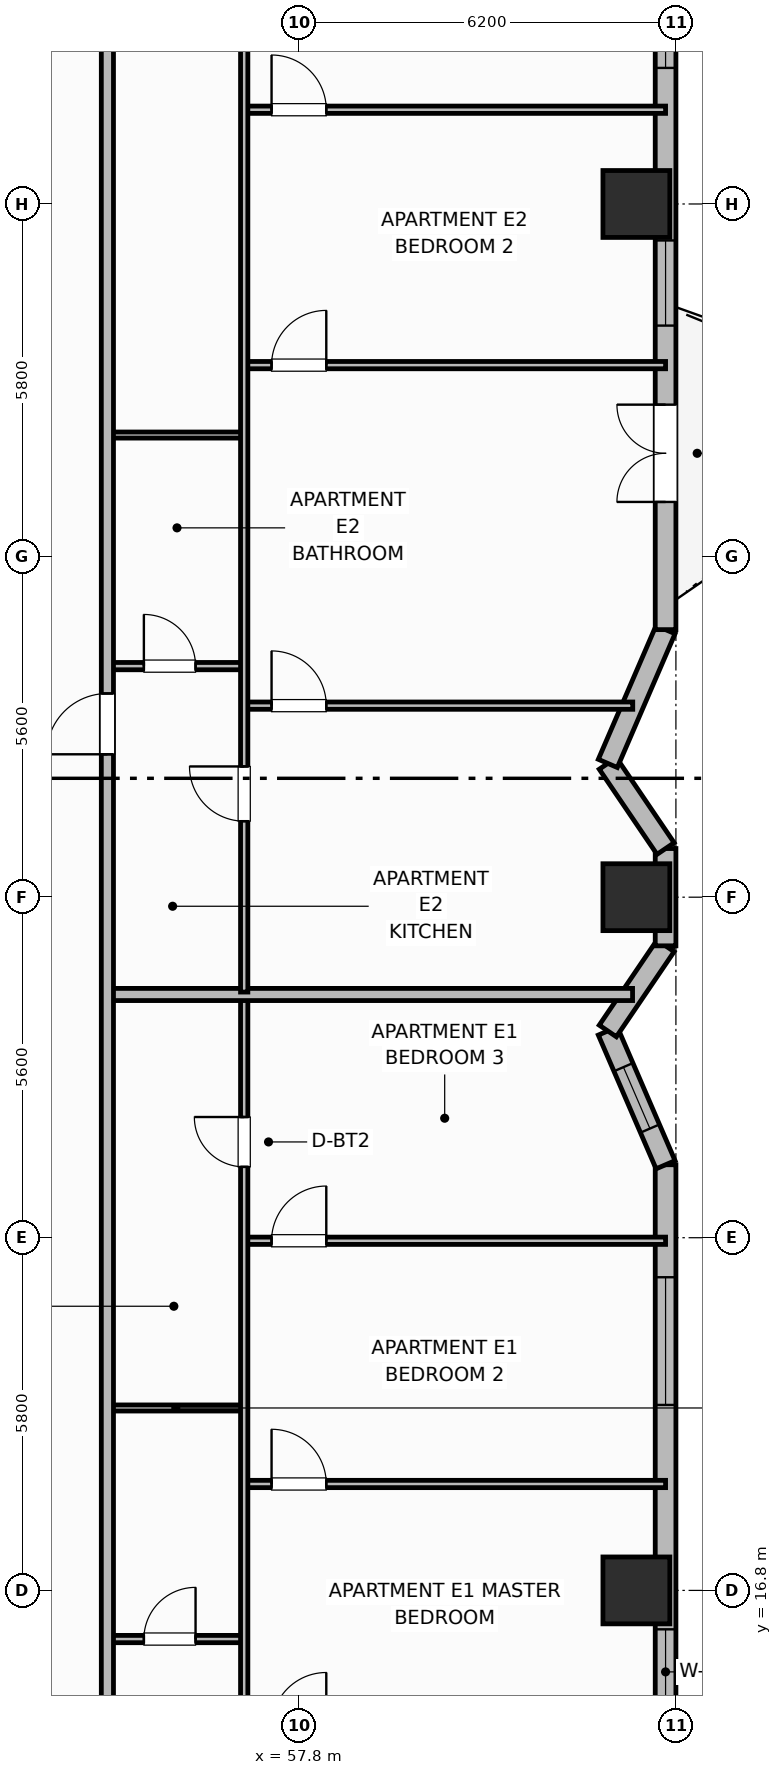
"""IFC4 building model, lengths in metres.
Left out: names, types, materials, properties, quantities, classifications, styles, units other than length and angle.
Written with IfcOpenShell. Run it as: python <this file> out.ifc"""

import sys

from ifc_helpers import new_model, si_unit, direction, frame, frame_2d, origin, origin_2d, place, context, subcontext, project, spatial, rectangle, extrude, element, fill, save


model = new_model("IFC4")
c1 = context("Model", 3, precision=1e-05, world=origin(), true_north=direction((0.0, 1.0)))
c2 = subcontext(c1, "Body", "Model", "MODEL_VIEW")
j1 = project(units=[si_unit("LENGTHUNIT", "METRE"), si_unit("PLANEANGLEUNIT", "RADIAN")], contexts=[c1])
p1 = place(None, origin())
s1 = spatial("IfcSite", under=j1, at=p1, CompositionType="ELEMENT")
p2 = place(p1, origin())
s2 = spatial("IfcBuilding", under=s1, at=p2, CompositionType="ELEMENT")
p3 = place(p2, frame((0.0, 0.0, 95.7)))
s3 = spatial("IfcBuildingStorey", under=s2, at=p3, CompositionType="ELEMENT", Elevation=95.7)
for number, where, z_axis, x_axis in (
    (1, (63.35, 16.8, 0.0), (0.0, 0.0, 1.0), (1.0, 0.0, 0.0)),
    (2, (63.35, 28.2, 0.0), (0.0, 0.0, 1.0), (1.0, 0.0, 0.0)),
    (3, (63.35, 39.6, 0.0), (0.0, 0.0, 1.0), (1.0, 0.0, 0.0)),
):
    element("IfcColumn", number, at=place(p3, frame(where, z_axis=z_axis, x_axis=x_axis)), inside=s3, PredefinedType="COLUMN", context=c2, shape_type="SweptSolid", body=[
        extrude(rectangle(XDim=1.1, YDim=1.1, at=origin_2d()), origin(), (0.0, 0.0, 1.0), 3.7),
    ])
p4 = place(p3, frame((63.83, 9.0, 0.0), z_axis=(0.0, 0.0, 1.0), x_axis=(0.0, 1.0, 0.0)))
e4 = element("IfcWall", 4, at=p4, inside=s3, PredefinedType="SOLIDWALL", context=c2, shape_type="SweptSolid", body=[
    extrude(rectangle(XDim=14.8, YDim=0.34, at=frame_2d((7.4, 0.0))), origin(), (0.0, 0.0, 1.0), 2.7),
])
p5 = place(p4, frame((2.9, 0.0, 0.68)))
e5 = element("IfcOpeningElement", 5, at=p5, cuts=e4, PredefinedType="OPENING", context=c2, shape_type="SweptSolid", body=[
    extrude(rectangle(XDim=2.1, YDim=1.9, at=frame_2d((1.05, 0.95))), frame((0.0, 0.18, 0.0), z_axis=(0.0, -1.0, 0.0), x_axis=(1.0, 0.0, 0.0)), (0.0, 0.0, 1.0), 0.36),
])
p6 = place(p4, frame((5.76, 0.0, 0.69)))
e6 = element("IfcOpeningElement", 6, at=p6, cuts=e4, PredefinedType="OPENING", context=c2, shape_type="SweptSolid", body=[
    extrude(rectangle(XDim=1.4, YDim=1.85, at=frame_2d((0.7, 0.925))), frame((0.0, 0.18, 0.0), z_axis=(0.0, -1.0, 0.0), x_axis=(1.0, 0.0, 0.0)), (0.0, 0.0, 1.0), 0.36),
])
p7 = place(p4, frame((10.85, 0.0, 0.68)))
e7 = element("IfcOpeningElement", 7, at=p7, cuts=e4, PredefinedType="OPENING", context=c2, shape_type="SweptSolid", body=[
    extrude(rectangle(XDim=2.1, YDim=1.9, at=frame_2d((1.05, 0.95))), frame((0.0, 0.18, 0.0), z_axis=(0.0, -1.0, 0.0), x_axis=(1.0, 0.0, 0.0)), (0.0, 0.0, 1.0), 0.36),
])
p8 = place(p3, frame((63.83, 23.8, 0.0), z_axis=(0.0, 0.0, 1.0), x_axis=(-0.396512124623, 0.918029484835, 0.0)))
e8 = element("IfcWall", 8, at=p8, inside=s3, PredefinedType="SOLIDWALL", context=c2, shape_type="SweptSolid", body=[
    extrude(rectangle(XDim=2.396, YDim=0.34, at=frame_2d((1.198, 0.0))), origin(), (0.0, 0.0, 1.0), 2.7),
])
p9 = place(p8, frame((0.648, 0.0, 0.89)))
e9 = element("IfcOpeningElement", 9, at=p9, cuts=e8, PredefinedType="OPENING", context=c2, shape_type="SweptSolid", body=[
    extrude(rectangle(XDim=1.1, YDim=1.65, at=frame_2d((0.55, 0.825))), frame((0.0, 0.18, 0.0), z_axis=(0.0, -1.0, 0.0), x_axis=(1.0, 0.0, 0.0)), (0.0, 0.0, 1.0), 0.36),
])
p10 = place(p3, frame((62.88, 26.0, 0.0), z_axis=(0.0, 0.0, 1.0), x_axis=(0.561607274182, 0.827403933751, 0.0)))
e10 = element("IfcWall", 10, at=p10, inside=s3, PredefinedType="SOLIDWALL", context=c2, shape_type="SweptSolid", body=[
    extrude(rectangle(XDim=1.692, YDim=0.34, at=frame_2d((0.846, 0.0))), origin(), (0.0, 0.0, 1.0), 2.7),
])
p11 = place(p3, frame((63.83, 27.4, 0.0), z_axis=(0.0, 0.0, 1.0), x_axis=(0.0, 1.0, 0.0)))
e11 = element("IfcWall", 11, at=p11, inside=s3, PredefinedType="SOLIDWALL", context=c2, shape_type="SweptSolid", body=[
    extrude(rectangle(XDim=1.6, YDim=0.34, at=frame_2d((0.8, 0.0))), origin(), (0.0, 0.0, 1.0), 2.7),
])
p12 = place(p3, frame((63.83, 29.0, 0.0), z_axis=(0.0, 0.0, 1.0), x_axis=(-0.561607274182, 0.827403933751, 0.0)))
e12 = element("IfcWall", 12, at=p12, inside=s3, PredefinedType="SOLIDWALL", context=c2, shape_type="SweptSolid", body=[
    extrude(rectangle(XDim=1.692, YDim=0.34, at=frame_2d((0.846, 0.0))), origin(), (0.0, 0.0, 1.0), 2.7),
])
p13 = place(p3, frame((62.88, 30.4, 0.0), z_axis=(0.0, 0.0, 1.0), x_axis=(0.396475042899, 0.918045500157, 0.0)))
e13 = element("IfcWall", 13, at=p13, inside=s3, PredefinedType="SOLIDWALL", context=c2, shape_type="SweptSolid", body=[
    extrude(rectangle(XDim=2.397, YDim=0.34, at=frame_2d((1.198, 0.0))), origin(), (0.0, 0.0, 1.0), 2.7),
])
p14 = place(p3, frame((63.83, 32.6, 0.0), z_axis=(0.0, 0.0, 1.0), x_axis=(0.0, 1.0, 0.0)))
e14 = element("IfcWall", 14, at=p14, inside=s3, PredefinedType="SOLIDWALL", context=c2, shape_type="SweptSolid", body=[
    extrude(rectangle(XDim=14.8, YDim=0.34, at=frame_2d((7.4, 0.0))), origin(), (0.0, 0.0, 1.0), 2.7),
])
p15 = place(p14, frame((2.1, 0.0, 0.0)))
e15 = element("IfcOpeningElement", 15, at=p15, cuts=e14, PredefinedType="OPENING", context=c2, shape_type="SweptSolid", body=[
    extrude(rectangle(XDim=1.6, YDim=2.1, at=frame_2d((0.8, 1.05))), frame((0.0, 0.18, 0.0), z_axis=(0.0, -1.0, 0.0), x_axis=(1.0, 0.0, 0.0)), (0.0, 0.0, 1.0), 0.36),
])
p16 = place(p14, frame((5.0, 0.0, 0.69)))
e16 = element("IfcOpeningElement", 16, at=p16, cuts=e14, PredefinedType="OPENING", context=c2, shape_type="SweptSolid", body=[
    extrude(rectangle(XDim=1.4, YDim=1.85, at=frame_2d((0.7, 0.925))), frame((0.0, 0.18, 0.0), z_axis=(0.0, -1.0, 0.0), x_axis=(1.0, 0.0, 0.0)), (0.0, 0.0, 1.0), 0.36),
])
p17 = place(p14, frame((9.238, 0.0, 0.73)))
e17 = element("IfcOpeningElement", 17, at=p17, cuts=e14, PredefinedType="OPENING", context=c2, shape_type="SweptSolid", body=[
    extrude(rectangle(XDim=1.8, YDim=1.85, at=frame_2d((0.9, 0.925))), frame((0.0, 0.18, 0.0), z_axis=(0.0, -1.0, 0.0), x_axis=(1.0, 0.0, 0.0)), (0.0, 0.0, 1.0), 0.36),
])
p18 = place(p3, frame((54.65, 16.0, 0.0), z_axis=(0.0, 0.0, 1.0), x_axis=(1.0, 0.0, 0.0)))
e18 = element("IfcWall", 18, at=p18, inside=s3, PredefinedType="PARTITIONING", context=c2, shape_type="SweptSolid", body=[
    extrude(rectangle(XDim=2.25, YDim=0.12, at=frame_2d((1.125, 0.0))), origin(), (0.0, 0.0, 1.0), 2.53),
])
p19 = place(p18, frame((0.6, 0.0, 0.0)))
e19 = element("IfcOpeningElement", 19, at=p19, cuts=e18, PredefinedType="OPENING", context=c2, shape_type="SweptSolid", body=[
    extrude(rectangle(XDim=0.85, YDim=2.1, at=frame_2d((0.425, 1.05))), frame((0.0, 0.07, 0.0), z_axis=(0.0, -1.0, 0.0), x_axis=(1.0, 0.0, 0.0)), (0.0, 0.0, 1.0), 0.14),
])
p20 = place(p3, frame((54.65, 19.8, 0.0), z_axis=(0.0, 0.0, 1.0), x_axis=(1.0, 0.0, 0.0)))
e20 = element("IfcWall", 20, at=p20, inside=s3, PredefinedType="PARTITIONING", context=c2, shape_type="SweptSolid", body=[
    extrude(rectangle(XDim=2.25, YDim=0.1, at=frame_2d((1.125, 0.0))), origin(), (0.0, 0.0, 1.0), 2.53),
])
p21 = place(p3, frame((56.9, 18.55, 0.0), z_axis=(0.0, 0.0, 1.0), x_axis=(1.0, 0.0, 0.0)))
e21 = element("IfcWall", 21, at=p21, inside=s3, PredefinedType="PARTITIONING", context=c2, shape_type="SweptSolid", body=[
    extrude(rectangle(XDim=6.93, YDim=0.12, at=frame_2d((3.465, 0.0))), origin(), (0.0, 0.0, 1.0), 2.53),
])
p22 = place(p21, frame((0.45, 0.0, 0.0)))
e22 = element("IfcOpeningElement", 22, at=p22, cuts=e21, PredefinedType="OPENING", context=c2, shape_type="SweptSolid", body=[
    extrude(rectangle(XDim=0.9, YDim=2.1, at=frame_2d((0.45, 1.05))), frame((0.0, 0.07, 0.0), z_axis=(0.0, -1.0, 0.0), x_axis=(1.0, 0.0, 0.0)), (0.0, 0.0, 1.0), 0.14),
])
p23 = place(p3, frame((56.9, 22.55, 0.0), z_axis=(0.0, 0.0, 1.0), x_axis=(1.0, 0.0, 0.0)))
e23 = element("IfcWall", 23, at=p23, inside=s3, PredefinedType="PARTITIONING", context=c2, shape_type="SweptSolid", body=[
    extrude(rectangle(XDim=6.93, YDim=0.12, at=frame_2d((3.465, 0.0))), origin(), (0.0, 0.0, 1.0), 2.53),
])
p24 = place(p23, frame((0.45, 0.0, 0.0)))
e24 = element("IfcOpeningElement", 24, at=p24, cuts=e23, PredefinedType="OPENING", context=c2, shape_type="SweptSolid", body=[
    extrude(rectangle(XDim=0.9, YDim=2.1, at=frame_2d((0.45, 1.05))), frame((0.0, 0.07, 0.0), z_axis=(0.0, -1.0, 0.0), x_axis=(1.0, 0.0, 0.0)), (0.0, 0.0, 1.0), 0.14),
])
p25 = place(p3, frame((56.9, 10.64, 0.0), z_axis=(0.0, 0.0, 1.0), x_axis=(0.0, 1.0, 0.0)))
e25 = element("IfcWall", 25, at=p25, inside=s3, PredefinedType="PARTITIONING", context=c2, shape_type="SweptSolid", body=[
    extrude(rectangle(XDim=15.92, YDim=0.12, at=frame_2d((7.96, 0.0))), origin(), (0.0, 0.0, 1.0), 2.53),
])
p26 = place(p25, frame((0.41, 0.0, 0.0)))
e26 = element("IfcOpeningElement", 26, at=p26, cuts=e25, PredefinedType="OPENING", context=c2, shape_type="SweptSolid", body=[
    extrude(rectangle(XDim=0.9, YDim=2.1, at=frame_2d((0.45, 1.05))), frame((0.0, 0.07, 0.0), z_axis=(0.0, -1.0, 0.0), x_axis=(1.0, 0.0, 0.0)), (0.0, 0.0, 1.0), 0.14),
])
p27 = place(p25, frame((13.125, 0.0, 0.0)))
e27 = element("IfcOpeningElement", 27, at=p27, cuts=e25, PredefinedType="OPENING", context=c2, shape_type="SweptSolid", body=[
    extrude(rectangle(XDim=0.82, YDim=2.08, at=frame_2d((0.41, 1.04))), frame((0.0, 0.07, 0.0), z_axis=(0.0, -1.0, 0.0), x_axis=(1.0, 0.0, 0.0)), (0.0, 0.0, 1.0), 0.14),
])
p28 = place(p3, frame((54.65, 26.6, 0.0), z_axis=(0.0, 0.0, 1.0), x_axis=(1.0, 0.0, 0.0)))
e28 = element("IfcWall", 28, at=p28, inside=s3, PredefinedType="PARTITIONING", context=c2, shape_type="SweptSolid", body=[
    extrude(rectangle(XDim=8.637, YDim=0.2, at=frame_2d((4.319, 0.0))), origin(), (0.0, 0.0, 1.0), 2.53),
])
p29 = place(p3, frame((54.65, 32.0, 0.0), z_axis=(0.0, 0.0, 1.0), x_axis=(1.0, 0.0, 0.0)))
e29 = element("IfcWall", 29, at=p29, inside=s3, PredefinedType="PARTITIONING", context=c2, shape_type="SweptSolid", body=[
    extrude(rectangle(XDim=2.25, YDim=0.12, at=frame_2d((1.125, 0.0))), origin(), (0.0, 0.0, 1.0), 2.53),
])
p30 = place(p29, frame((0.6, 0.0, 0.0)))
e30 = element("IfcOpeningElement", 30, at=p30, cuts=e29, PredefinedType="OPENING", context=c2, shape_type="SweptSolid", body=[
    extrude(rectangle(XDim=0.85, YDim=2.1, at=frame_2d((0.425, 1.05))), frame((0.0, 0.07, 0.0), z_axis=(0.0, -1.0, 0.0), x_axis=(1.0, 0.0, 0.0)), (0.0, 0.0, 1.0), 0.14),
])
p31 = place(p3, frame((54.65, 35.8, 0.0), z_axis=(0.0, 0.0, 1.0), x_axis=(1.0, 0.0, 0.0)))
e31 = element("IfcWall", 31, at=p31, inside=s3, PredefinedType="PARTITIONING", context=c2, shape_type="SweptSolid", body=[
    extrude(rectangle(XDim=2.25, YDim=0.1, at=frame_2d((1.125, 0.0))), origin(), (0.0, 0.0, 1.0), 2.53),
])
p32 = place(p3, frame((56.9, 31.35, 0.0), z_axis=(0.0, 0.0, 1.0), x_axis=(1.0, 0.0, 0.0)))
e32 = element("IfcWall", 32, at=p32, inside=s3, PredefinedType="PARTITIONING", context=c2, shape_type="SweptSolid", body=[
    extrude(rectangle(XDim=6.39, YDim=0.12, at=frame_2d((3.195, 0.0))), origin(), (0.0, 0.0, 1.0), 2.53),
])
p33 = place(p32, frame((0.45, 0.0, 0.0)))
e33 = element("IfcOpeningElement", 33, at=p33, cuts=e32, PredefinedType="OPENING", context=c2, shape_type="SweptSolid", body=[
    extrude(rectangle(XDim=0.9, YDim=2.1, at=frame_2d((0.45, 1.05))), frame((0.0, 0.07, 0.0), z_axis=(0.0, -1.0, 0.0), x_axis=(1.0, 0.0, 0.0)), (0.0, 0.0, 1.0), 0.14),
])
p34 = place(p3, frame((56.9, 36.95, 0.0), z_axis=(0.0, 0.0, 1.0), x_axis=(1.0, 0.0, 0.0)))
e34 = element("IfcWall", 34, at=p34, inside=s3, PredefinedType="PARTITIONING", context=c2, shape_type="SweptSolid", body=[
    extrude(rectangle(XDim=6.93, YDim=0.12, at=frame_2d((3.465, 0.0))), origin(), (0.0, 0.0, 1.0), 2.53),
])
p35 = place(p34, frame((0.45, 0.0, 0.0)))
e35 = element("IfcOpeningElement", 35, at=p35, cuts=e34, PredefinedType="OPENING", context=c2, shape_type="SweptSolid", body=[
    extrude(rectangle(XDim=0.9, YDim=2.1, at=frame_2d((0.45, 1.05))), frame((0.0, 0.07, 0.0), z_axis=(0.0, -1.0, 0.0), x_axis=(1.0, 0.0, 0.0)), (0.0, 0.0, 1.0), 0.14),
])
p36 = place(p3, frame((56.9, 41.15, 0.0), z_axis=(0.0, 0.0, 1.0), x_axis=(1.0, 0.0, 0.0)))
e36 = element("IfcWall", 36, at=p36, inside=s3, PredefinedType="PARTITIONING", context=c2, shape_type="SweptSolid", body=[
    extrude(rectangle(XDim=6.93, YDim=0.12, at=frame_2d((3.465, 0.0))), origin(), (0.0, 0.0, 1.0), 2.53),
])
p37 = place(p36, frame((0.45, 0.0, 0.0)))
e37 = element("IfcOpeningElement", 37, at=p37, cuts=e36, PredefinedType="OPENING", context=c2, shape_type="SweptSolid", body=[
    extrude(rectangle(XDim=0.9, YDim=2.1, at=frame_2d((0.45, 1.05))), frame((0.0, 0.07, 0.0), z_axis=(0.0, -1.0, 0.0), x_axis=(1.0, 0.0, 0.0)), (0.0, 0.0, 1.0), 0.14),
])
p38 = place(p3, frame((56.9, 26.64, 0.0), z_axis=(0.0, 0.0, 1.0), x_axis=(0.0, 1.0, 0.0)))
e38 = element("IfcWall", 38, at=p38, inside=s3, PredefinedType="PARTITIONING", context=c2, shape_type="SweptSolid", body=[
    extrude(rectangle(XDim=19.12, YDim=0.12, at=frame_2d((9.56, 0.0))), origin(), (0.0, 0.0, 1.0), 2.53),
])
p39 = place(p38, frame((2.81, 0.0, 0.0)))
e39 = element("IfcOpeningElement", 39, at=p39, cuts=e38, PredefinedType="OPENING", context=c2, shape_type="SweptSolid", body=[
    extrude(rectangle(XDim=0.9, YDim=2.1, at=frame_2d((0.45, 1.05))), frame((0.0, 0.07, 0.0), z_axis=(0.0, -1.0, 0.0), x_axis=(1.0, 0.0, 0.0)), (0.0, 0.0, 1.0), 0.14),
])
p40 = place(p38, frame((16.18, 0.0, 0.0)))
e40 = element("IfcOpeningElement", 40, at=p40, cuts=e38, PredefinedType="OPENING", context=c2, shape_type="SweptSolid", body=[
    extrude(rectangle(XDim=0.82, YDim=2.08, at=frame_2d((0.41, 1.04))), frame((0.0, 0.07, 0.0), z_axis=(0.0, -1.0, 0.0), x_axis=(1.0, 0.0, 0.0)), (0.0, 0.0, 1.0), 0.14),
])
p41 = place(p3, frame((54.65, 10.6, 0.0), z_axis=(0.0, 0.0, 1.0), x_axis=(0.0, 1.0, 0.0)))
e41 = element("IfcWall", 41, at=p41, inside=s3, PredefinedType="PARTITIONING", context=c2, shape_type="SweptSolid", body=[
    extrude(rectangle(XDim=35.2, YDim=0.2, at=frame_2d((17.6, 0.0))), origin(), (0.0, 0.0, 1.0), 2.53),
])
p42 = place(p41, frame((2.65, 0.0, 0.0)))
e42 = element("IfcOpeningElement", 42, at=p42, cuts=e41, PredefinedType="OPENING", context=c2, shape_type="SweptSolid", body=[
    extrude(rectangle(XDim=1.0, YDim=2.15, at=frame_2d((0.5, 1.075))), frame((0.0, 0.11, 0.0), z_axis=(0.0, -1.0, 0.0), x_axis=(1.0, 0.0, 0.0)), (0.0, 0.0, 1.0), 0.22),
])
p43 = place(p41, frame((19.95, 0.0, 0.0)))
e43 = element("IfcOpeningElement", 43, at=p43, cuts=e41, PredefinedType="OPENING", context=c2, shape_type="SweptSolid", body=[
    extrude(rectangle(XDim=1.0, YDim=2.15, at=frame_2d((0.5, 1.075))), frame((0.0, 0.11, 0.0), z_axis=(0.0, -1.0, 0.0), x_axis=(1.0, 0.0, 0.0)), (0.0, 0.0, 1.0), 0.22),
])
p44 = place(p6, origin())
e44 = element("IfcWindow", 44, at=p44, inside=s3, PartitioningType="SINGLE_PANEL", PredefinedType="WINDOW", context=c2, shape_type="SweptSolid", body=[
    extrude(rectangle(XDim=1.4, YDim=1.85, at=frame_2d((0.7, 0.925))), frame((0.0, 0.03, 0.0), z_axis=(0.0, -1.0, 0.0), x_axis=(1.0, 0.0, 0.0)), (0.0, 0.0, 1.0), 0.06),
])
fill(e6, e44)
p45 = place(p7, origin())
e45 = element("IfcWindow", 45, at=p45, inside=s3, PartitioningType="SINGLE_PANEL", PredefinedType="WINDOW", context=c2, shape_type="SweptSolid", body=[
    extrude(rectangle(XDim=2.1, YDim=1.9, at=frame_2d((1.05, 0.95))), frame((0.0, 0.03, 0.0), z_axis=(0.0, -1.0, 0.0), x_axis=(1.0, 0.0, 0.0)), (0.0, 0.0, 1.0), 0.06),
])
fill(e7, e45)
p46 = place(p9, origin())
e46 = element("IfcWindow", 46, at=p46, inside=s3, PartitioningType="SINGLE_PANEL", PredefinedType="WINDOW", context=c2, shape_type="SweptSolid", body=[
    extrude(rectangle(XDim=1.1, YDim=1.65, at=frame_2d((0.55, 0.825))), frame((0.0, 0.03, 0.0), z_axis=(0.0, -1.0, 0.0), x_axis=(1.0, 0.0, 0.0)), (0.0, 0.0, 1.0), 0.06),
])
fill(e9, e46)
p47 = place(p15, origin())
e47 = element("IfcDoor", 47, at=p47, inside=s3, OperationType="DOUBLE_DOOR_SINGLE_SWING", PredefinedType="DOOR", context=c2, shape_type="SweptSolid", body=[
    extrude(rectangle(XDim=1.6, YDim=2.1, at=frame_2d((0.8, 1.05))), frame((0.0, 0.025, 0.0), z_axis=(0.0, -1.0, 0.0), x_axis=(1.0, 0.0, 0.0)), (0.0, 0.0, 1.0), 0.05),
])
fill(e15, e47)
p48 = place(p16, origin())
e48 = element("IfcWindow", 48, at=p48, inside=s3, PartitioningType="SINGLE_PANEL", PredefinedType="WINDOW", context=c2, shape_type="SweptSolid", body=[
    extrude(rectangle(XDim=1.4, YDim=1.85, at=frame_2d((0.7, 0.925))), frame((0.0, 0.03, 0.0), z_axis=(0.0, -1.0, 0.0), x_axis=(1.0, 0.0, 0.0)), (0.0, 0.0, 1.0), 0.06),
])
fill(e16, e48)
p49 = place(p17, origin())
e49 = element("IfcWindow", 49, at=p49, inside=s3, PartitioningType="SINGLE_PANEL", PredefinedType="WINDOW", context=c2, shape_type="SweptSolid", body=[
    extrude(rectangle(XDim=1.8, YDim=1.85, at=frame_2d((0.9, 0.925))), frame((0.0, 0.03, 0.0), z_axis=(0.0, -1.0, 0.0), x_axis=(1.0, 0.0, 0.0)), (0.0, 0.0, 1.0), 0.06),
])
fill(e17, e49)
p50 = place(p19, origin())
e50 = element("IfcDoor", 50, at=p50, inside=s3, OperationType="SINGLE_SWING_RIGHT", PredefinedType="DOOR", context=c2, shape_type="SweptSolid", body=[
    extrude(rectangle(XDim=0.85, YDim=2.1, at=frame_2d((0.425, 1.05))), frame((0.0, 0.025, 0.0), z_axis=(0.0, -1.0, 0.0), x_axis=(1.0, 0.0, 0.0)), (0.0, 0.0, 1.0), 0.05),
])
fill(e19, e50)
p51 = place(p22, origin())
e51 = element("IfcDoor", 51, at=p51, inside=s3, OperationType="SINGLE_SWING_LEFT", PredefinedType="DOOR", context=c2, shape_type="SweptSolid", body=[
    extrude(rectangle(XDim=0.9, YDim=2.1, at=frame_2d((0.45, 1.05))), frame((0.0, 0.025, 0.0), z_axis=(0.0, -1.0, 0.0), x_axis=(1.0, 0.0, 0.0)), (0.0, 0.0, 1.0), 0.05),
])
fill(e22, e51)
p52 = place(p24, origin())
e52 = element("IfcDoor", 52, at=p52, inside=s3, OperationType="SINGLE_SWING_RIGHT", PredefinedType="DOOR", context=c2, shape_type="SweptSolid", body=[
    extrude(rectangle(XDim=0.9, YDim=2.1, at=frame_2d((0.45, 1.05))), frame((0.0, 0.025, 0.0), z_axis=(0.0, -1.0, 0.0), x_axis=(1.0, 0.0, 0.0)), (0.0, 0.0, 1.0), 0.05),
])
fill(e24, e52)
p53 = place(p27, origin())
e53 = element("IfcDoor", 53, at=p53, inside=s3, OperationType="SINGLE_SWING_RIGHT", PredefinedType="DOOR", context=c2, shape_type="SweptSolid", body=[
    extrude(rectangle(XDim=0.82, YDim=2.08, at=frame_2d((0.41, 1.04))), frame((0.0, 0.025, 0.0), z_axis=(0.0, -1.0, 0.0), x_axis=(1.0, 0.0, 0.0)), (0.0, 0.0, 1.0), 0.05),
])
fill(e27, e53)
p54 = place(p30, origin())
e54 = element("IfcDoor", 54, at=p54, inside=s3, OperationType="SINGLE_SWING_LEFT", PredefinedType="DOOR", context=c2, shape_type="SweptSolid", body=[
    extrude(rectangle(XDim=0.85, YDim=2.1, at=frame_2d((0.425, 1.05))), frame((0.0, 0.025, 0.0), z_axis=(0.0, -1.0, 0.0), x_axis=(1.0, 0.0, 0.0)), (0.0, 0.0, 1.0), 0.05),
])
fill(e30, e54)
p55 = place(p33, origin())
e55 = element("IfcDoor", 55, at=p55, inside=s3, OperationType="SINGLE_SWING_LEFT", PredefinedType="DOOR", context=c2, shape_type="SweptSolid", body=[
    extrude(rectangle(XDim=0.9, YDim=2.1, at=frame_2d((0.45, 1.05))), frame((0.0, 0.025, 0.0), z_axis=(0.0, -1.0, 0.0), x_axis=(1.0, 0.0, 0.0)), (0.0, 0.0, 1.0), 0.05),
])
fill(e33, e55)
p56 = place(p35, origin())
e56 = element("IfcDoor", 56, at=p56, inside=s3, OperationType="SINGLE_SWING_RIGHT", PredefinedType="DOOR", context=c2, shape_type="SweptSolid", body=[
    extrude(rectangle(XDim=0.9, YDim=2.1, at=frame_2d((0.45, 1.05))), frame((0.0, 0.025, 0.0), z_axis=(0.0, -1.0, 0.0), x_axis=(1.0, 0.0, 0.0)), (0.0, 0.0, 1.0), 0.05),
])
fill(e35, e56)
p57 = place(p37, origin())
e57 = element("IfcDoor", 57, at=p57, inside=s3, OperationType="SINGLE_SWING_LEFT", PredefinedType="DOOR", context=c2, shape_type="SweptSolid", body=[
    extrude(rectangle(XDim=0.9, YDim=2.1, at=frame_2d((0.45, 1.05))), frame((0.0, 0.025, 0.0), z_axis=(0.0, -1.0, 0.0), x_axis=(1.0, 0.0, 0.0)), (0.0, 0.0, 1.0), 0.05),
])
fill(e37, e57)
p58 = place(p39, origin())
e58 = element("IfcDoor", 58, at=p58, inside=s3, OperationType="SINGLE_SWING_RIGHT", PredefinedType="DOOR", context=c2, shape_type="SweptSolid", body=[
    extrude(rectangle(XDim=0.9, YDim=2.1, at=frame_2d((0.45, 1.05))), frame((0.0, 0.025, 0.0), z_axis=(0.0, -1.0, 0.0), x_axis=(1.0, 0.0, 0.0)), (0.0, 0.0, 1.0), 0.05),
])
fill(e39, e58)
p59 = place(p43, origin())
e59 = element("IfcDoor", 59, at=p59, inside=s3, OperationType="SINGLE_SWING_LEFT", PredefinedType="DOOR", context=c2, shape_type="SweptSolid", body=[
    extrude(rectangle(XDim=1.0, YDim=2.15, at=frame_2d((0.5, 1.075))), frame((0.0, 0.025, 0.0), z_axis=(0.0, -1.0, 0.0), x_axis=(1.0, 0.0, 0.0)), (0.0, 0.0, 1.0), 0.05),
])
fill(e43, e59)
save(model, sys.argv[1])
